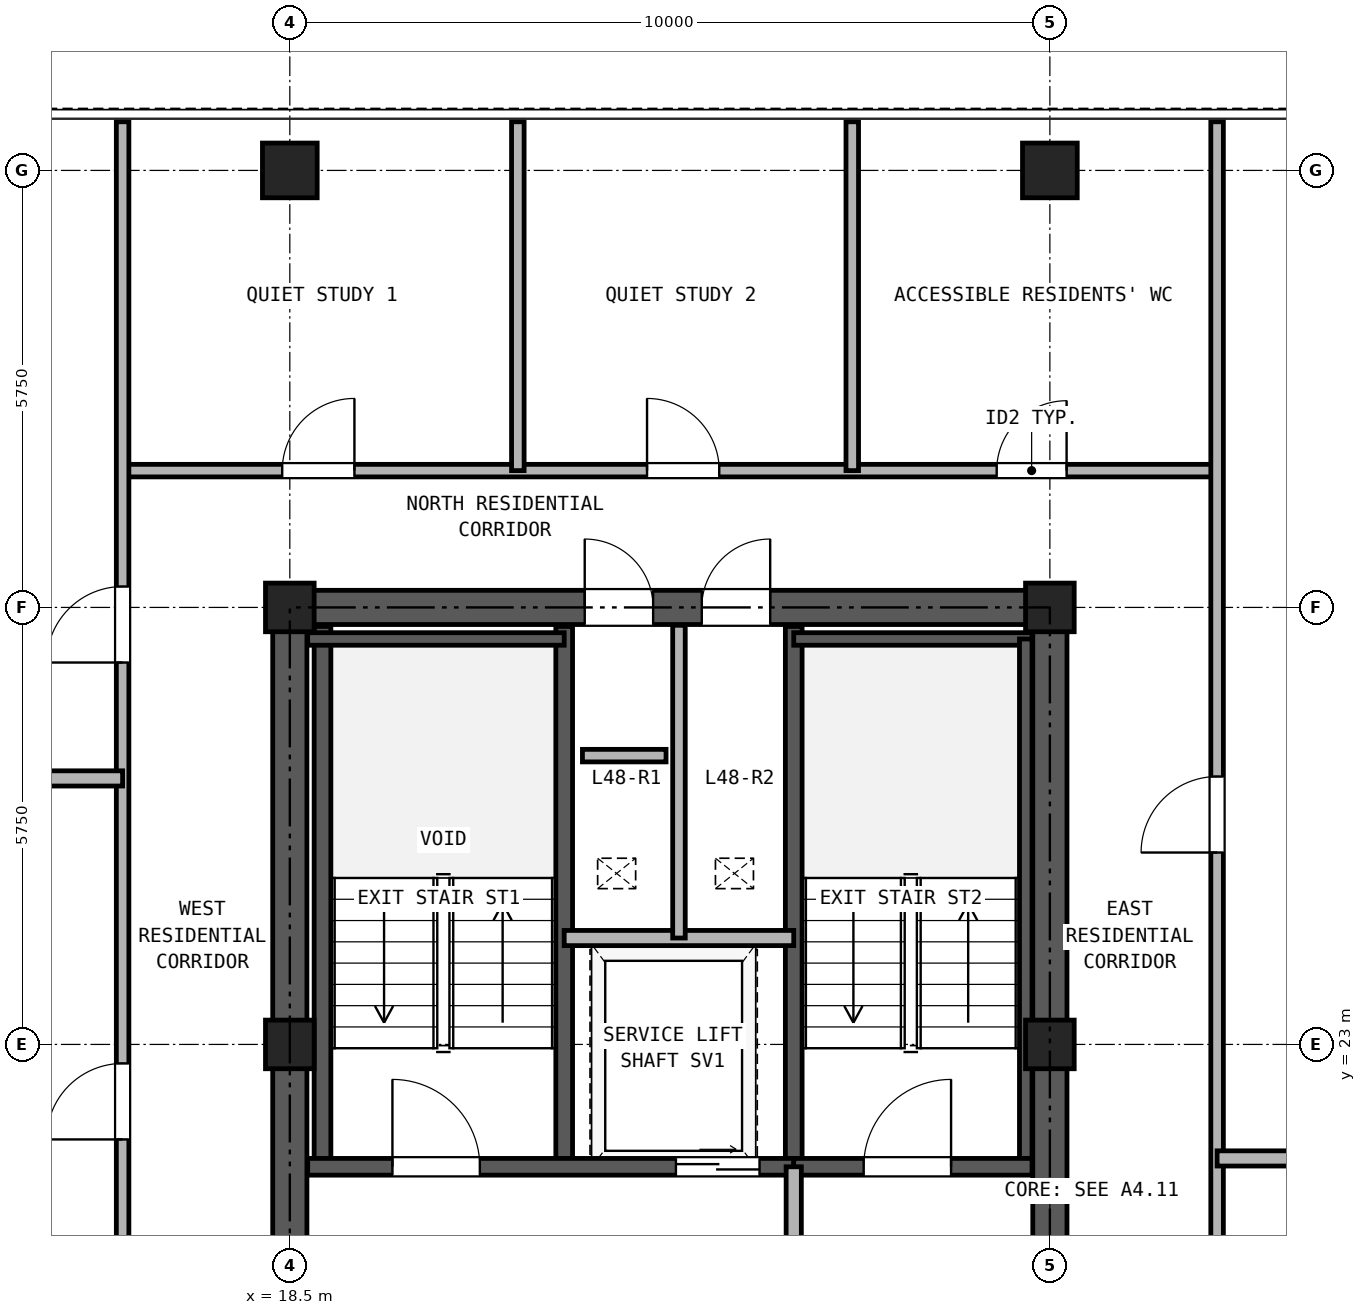
"""IFC4 building model, lengths in metres.
Left out: names, types, materials, properties, quantities, classifications, styles, units other than length and angle.
Written with IfcOpenShell. Run it as: python <this file> out.ifc"""

import sys

from ifc_helpers import new_model, si_unit, direction, frame, frame_2d, origin, origin_2d, place, context, subcontext, project, spatial, rectangle, hollow_rectangle, extrude, source, transform, mapped, element, fill, save


model = new_model("IFC4")
c1 = context("Model", 3, precision=1e-05, world=origin(), true_north=direction((0.0, 1.0)))
c2 = subcontext(c1, "Body", "Model", "MODEL_VIEW")
j1 = project(units=[si_unit("LENGTHUNIT", "METRE"), si_unit("PLANEANGLEUNIT", "RADIAN")], contexts=[c1])
p1 = place(None, origin())
s1 = spatial("IfcSite", under=j1, at=p1, CompositionType="ELEMENT")
p2 = place(p1, origin())
s2 = spatial("IfcBuilding", under=s1, at=p2, CompositionType="ELEMENT")
p3 = place(p2, frame((0.0, 0.0, 172.1)))
s3 = spatial("IfcBuildingStorey", under=s2, at=p3, CompositionType="ELEMENT", Elevation=172.1)
m1 = source(origin(), c2, "Body", "SweptSolid", [
    extrude(hollow_rectangle(XDim=0.72, YDim=0.72, WallThickness=0.04, at=origin_2d()), origin(), (0.0, 0.0, 1.0), 2.95),
])
for number, where, z_axis, x_axis in (
    (1, (18.5, 34.5, 0.0), (0.0, 0.0, 1.0), (1.0, 0.0, 0.0)),
    (2, (28.5, 34.5, 0.0), (0.0, 0.0, 1.0), (1.0, 0.0, 0.0)),
):
    element("IfcColumn", number, at=place(p3, frame(where, z_axis=z_axis, x_axis=x_axis)), inside=s3, PredefinedType="COLUMN", context=c2, shape_type="MappedRepresentation", body=[
        mapped(m1, transform((0.0, 0.0, 0.0), x_axis=(1.0, 0.0, 0.0), y_axis=(0.0, 1.0, 0.0), z_axis=(0.0, 0.0, 1.0), scale=1.0)),
    ])
m2 = source(origin(), c2, "Body", "SweptSolid", [
    extrude(hollow_rectangle(XDim=0.64, YDim=0.64, WallThickness=0.035, at=origin_2d()), origin(), (0.0, 0.0, 1.0), 2.95),
])
for number, where, z_axis, x_axis in (
    (3, (18.5, 23.0, 0.0), (0.0, 0.0, 1.0), (1.0, 0.0, 0.0)),
    (4, (18.5, 28.75, 0.0), (0.0, 0.0, 1.0), (1.0, 0.0, 0.0)),
    (5, (28.5, 23.0, 0.0), (0.0, 0.0, 1.0), (1.0, 0.0, 0.0)),
    (6, (28.5, 28.75, 0.0), (0.0, 0.0, 1.0), (1.0, 0.0, 0.0)),
):
    element("IfcColumn", number, at=place(p3, frame(where, z_axis=z_axis, x_axis=x_axis)), inside=s3, PredefinedType="COLUMN", context=c2, shape_type="MappedRepresentation", body=[
        mapped(m2, transform((0.0, 0.0, 0.0), x_axis=(1.0, 0.0, 0.0), y_axis=(0.0, 1.0, 0.0), z_axis=(0.0, 0.0, 1.0), scale=1.0)),
    ])
p4 = place(p3, frame((18.275, 28.75, 0.0), z_axis=(0.0, 0.0, 1.0), x_axis=(1.0, 0.0, 0.0)))
e7 = element("IfcWall", 7, at=p4, inside=s3, PredefinedType="SHEAR", context=c2, shape_type="SweptSolid", body=[
    extrude(rectangle(XDim=10.45, YDim=0.45, at=frame_2d((5.225, 0.0))), origin(), (0.0, 0.0, 1.0), 2.95),
])
p5 = place(p4, frame((4.105, 0.0, 0.0)))
e8 = element("IfcOpeningElement", 8, at=p5, cuts=e7, PredefinedType="OPENING", context=c2, shape_type="SweptSolid", body=[
    extrude(rectangle(XDim=0.9, YDim=2.05, at=frame_2d((0.45, 1.025))), frame((0.0, 0.235, 0.0), z_axis=(0.0, -1.0, 0.0), x_axis=(1.0, 0.0, 0.0)), (0.0, 0.0, 1.0), 0.47),
])
p6 = place(p4, frame((5.645, 0.0, 0.0)))
e9 = element("IfcOpeningElement", 9, at=p6, cuts=e7, PredefinedType="OPENING", context=c2, shape_type="SweptSolid", body=[
    extrude(rectangle(XDim=0.9, YDim=2.05, at=frame_2d((0.45, 1.025))), frame((0.0, 0.235, 0.0), z_axis=(0.0, -1.0, 0.0), x_axis=(1.0, 0.0, 0.0)), (0.0, 0.0, 1.0), 0.47),
])
p7 = place(p3, frame((18.5, 11.725, 0.0), z_axis=(0.0, 0.0, 1.0), x_axis=(0.0, 1.0, 0.0)))
e10 = element("IfcWall", 10, at=p7, inside=s3, PredefinedType="SHEAR", context=c2, shape_type="SweptSolid", body=[
    extrude(rectangle(XDim=16.8, YDim=0.45, at=frame_2d((8.4, 0.0))), origin(), (0.0, 0.0, 1.0), 2.95),
])
p8 = place(p7, frame((7.425, 0.0, 0.0)))
e11 = element("IfcOpeningElement", 11, at=p8, cuts=e10, PredefinedType="OPENING", context=c2, shape_type="SweptSolid", body=[
    extrude(rectangle(XDim=1.15, YDim=2.2, at=frame_2d((0.575, 1.1))), frame((0.0, 0.235, 0.0), z_axis=(0.0, -1.0, 0.0), x_axis=(1.0, 0.0, 0.0)), (0.0, 0.0, 1.0), 0.47),
])
p9 = place(p3, frame((28.5, 11.725, 0.0), z_axis=(0.0, 0.0, 1.0), x_axis=(0.0, 1.0, 0.0)))
e12 = element("IfcWall", 12, at=p9, inside=s3, PredefinedType="SHEAR", context=c2, shape_type="SweptSolid", body=[
    extrude(rectangle(XDim=16.8, YDim=0.45, at=frame_2d((8.4, 0.0))), origin(), (0.0, 0.0, 1.0), 2.95),
])
p10 = place(p9, frame((7.425, 0.0, 0.0)))
e13 = element("IfcOpeningElement", 13, at=p10, cuts=e12, PredefinedType="OPENING", context=c2, shape_type="SweptSolid", body=[
    extrude(rectangle(XDim=1.15, YDim=2.2, at=frame_2d((0.575, 1.1))), frame((0.0, 0.235, 0.0), z_axis=(0.0, -1.0, 0.0), x_axis=(1.0, 0.0, 0.0)), (0.0, 0.0, 1.0), 0.47),
])
for number, where, z_axis, x_axis in (
    (14, (18.93, 21.39, 0.0), (0.0, 0.0, 1.0), (0.0, 1.0, 0.0)),
    (15, (22.11, 21.39, 0.0), (0.0, 0.0, 1.0), (0.0, 1.0, 0.0)),
    (16, (25.13, 21.39, 0.0), (0.0, 0.0, 1.0), (0.0, 1.0, 0.0)),
):
    element("IfcWall", number, at=place(p3, frame(where, z_axis=z_axis, x_axis=x_axis)), inside=s3, PredefinedType="SOLIDWALL", context=c2, shape_type="SweptSolid", body=[
        extrude(rectangle(XDim=7.11, YDim=0.22, at=frame_2d((3.555, 0.0))), origin(), (0.0, 0.0, 1.0), 2.95),
    ])
p11 = place(p3, frame((18.735, 28.335, 0.0), z_axis=(0.0, 0.0, 1.0), x_axis=(1.0, 0.0, 0.0)))
e17 = element("IfcWall", 17, at=p11, inside=s3, PredefinedType="PARTITIONING", context=c2, shape_type="SweptSolid", body=[
    extrude(rectangle(XDim=3.375, YDim=0.165, at=frame_2d((1.688, 0.0))), origin(), (0.0, 0.0, 1.0), 2.95),
])
p12 = place(p3, frame((25.13, 28.335, 0.0), z_axis=(0.0, 0.0, 1.0), x_axis=(1.0, 0.0, 0.0)))
e18 = element("IfcWall", 18, at=p12, inside=s3, PredefinedType="PARTITIONING", context=c2, shape_type="SweptSolid", body=[
    extrude(rectangle(XDim=3.135, YDim=0.165, at=frame_2d((1.567, 0.0))), origin(), (0.0, 0.0, 1.0), 2.95),
])
p13 = place(p3, frame((28.183, 21.39, 0.0), z_axis=(0.0, 0.0, 1.0), x_axis=(0.0, 1.0, 0.0)))
e19 = element("IfcWall", 19, at=p13, inside=s3, PredefinedType="PARTITIONING", context=c2, shape_type="SweptSolid", body=[
    extrude(rectangle(XDim=6.945, YDim=0.165, at=frame_2d((3.473, 0.0))), origin(), (0.0, 0.0, 1.0), 2.95),
])
p14 = place(p3, frame((18.735, 21.39, 0.0), z_axis=(0.0, 0.0, 1.0), x_axis=(1.0, 0.0, 0.0)))
e20 = element("IfcWall", 20, at=p14, inside=s3, PredefinedType="SOLIDWALL", context=c2, shape_type="SweptSolid", body=[
    extrude(rectangle(XDim=6.395, YDim=0.22, at=frame_2d((3.197, 0.0))), origin(), (0.0, 0.0, 1.0), 2.95),
])
p15 = place(p14, frame((1.115, 0.0, 0.0)))
e21 = element("IfcOpeningElement", 21, at=p15, cuts=e20, PredefinedType="OPENING", context=c2, shape_type="SweptSolid", body=[
    extrude(rectangle(XDim=1.15, YDim=2.2, at=frame_2d((0.575, 1.1))), frame((0.0, 0.12, 0.0), z_axis=(0.0, -1.0, 0.0), x_axis=(1.0, 0.0, 0.0)), (0.0, 0.0, 1.0), 0.24),
])
p16 = place(p14, frame((4.845, 0.0, 0.0)))
e22 = element("IfcOpeningElement", 22, at=p16, cuts=e20, PredefinedType="OPENING", context=c2, shape_type="SweptSolid", body=[
    extrude(rectangle(XDim=1.1, YDim=2.25, at=frame_2d((0.55, 1.125))), frame((0.0, 0.12, 0.0), z_axis=(0.0, -1.0, 0.0), x_axis=(1.0, 0.0, 0.0)), (0.0, 0.0, 1.0), 0.24),
])
p17 = place(p3, frame((25.13, 21.39, 0.0), z_axis=(0.0, 0.0, 1.0), x_axis=(1.0, 0.0, 0.0)))
e23 = element("IfcWall", 23, at=p17, inside=s3, PredefinedType="SOLIDWALL", context=c2, shape_type="SweptSolid", body=[
    extrude(rectangle(XDim=3.135, YDim=0.22, at=frame_2d((1.567, 0.0))), origin(), (0.0, 0.0, 1.0), 2.95),
])
p18 = place(p17, frame((0.92, 0.0, 0.0)))
e24 = element("IfcOpeningElement", 24, at=p18, cuts=e23, PredefinedType="OPENING", context=c2, shape_type="SweptSolid", body=[
    extrude(rectangle(XDim=1.15, YDim=2.2, at=frame_2d((0.575, 1.1))), frame((0.0, 0.12, 0.0), z_axis=(0.0, -1.0, 0.0), x_axis=(1.0, 0.0, 0.0)), (0.0, 0.0, 1.0), 0.24),
])
p19 = place(p3, frame((22.11, 24.4, 0.0), z_axis=(0.0, 0.0, 1.0), x_axis=(1.0, 0.0, 0.0)))
e25 = element("IfcWall", 25, at=p19, inside=s3, PredefinedType="PARTITIONING", context=c2, shape_type="SweptSolid", body=[
    extrude(rectangle(XDim=3.02, YDim=0.2, at=frame_2d((1.51, 0.0))), origin(), (0.0, 0.0, 1.0), 2.95),
])
p20 = place(p3, frame((23.62, 24.4, 0.0), z_axis=(0.0, 0.0, 1.0), x_axis=(0.0, 1.0, 0.0)))
e26 = element("IfcWall", 26, at=p20, inside=s3, PredefinedType="PARTITIONING", context=c2, shape_type="SweptSolid", body=[
    extrude(rectangle(XDim=4.115, YDim=0.165, at=frame_2d((2.058, 0.0))), origin(), (0.0, 0.0, 1.0), 2.95),
])
p21 = place(p3, frame((25.13, 18.0, 0.0), z_axis=(0.0, 0.0, 1.0), x_axis=(0.0, 1.0, 0.0)))
e27 = element("IfcWall", 27, at=p21, inside=s3, PredefinedType="PARTITIONING", context=c2, shape_type="SweptSolid", body=[
    extrude(rectangle(XDim=3.39, YDim=0.2, at=frame_2d((1.695, 0.0))), origin(), (0.0, 0.0, 1.0), 2.95),
])
p22 = place(p21, frame((1.1, 0.0, 0.0)))
e28 = element("IfcOpeningElement", 28, at=p22, cuts=e27, PredefinedType="OPENING", context=c2, shape_type="SweptSolid", body=[
    extrude(rectangle(XDim=1.15, YDim=2.2, at=frame_2d((0.575, 1.1))), frame((0.0, 0.11, 0.0), z_axis=(0.0, -1.0, 0.0), x_axis=(1.0, 0.0, 0.0)), (0.0, 0.0, 1.0), 0.22),
])
p23 = place(p3, frame((16.3, 30.55, 0.0), z_axis=(0.0, 0.0, 1.0), x_axis=(1.0, 0.0, 0.0)))
e29 = element("IfcWall", 29, at=p23, inside=s3, PredefinedType="PARTITIONING", context=c2, shape_type="SweptSolid", body=[
    extrude(rectangle(XDim=14.4, YDim=0.165, at=frame_2d((7.2, 0.0))), origin(), (0.0, 0.0, 1.0), 2.95),
])
p24 = place(p23, frame((2.1, 0.0, 0.0)))
e30 = element("IfcOpeningElement", 30, at=p24, cuts=e29, PredefinedType="OPENING", context=c2, shape_type="SweptSolid", body=[
    extrude(rectangle(XDim=0.95, YDim=2.15, at=frame_2d((0.475, 1.075))), frame((0.0, 0.093, 0.0), z_axis=(0.0, -1.0, 0.0), x_axis=(1.0, 0.0, 0.0)), (0.0, 0.0, 1.0), 0.185),
])
p25 = place(p23, frame((6.9, 0.0, 0.0)))
e31 = element("IfcOpeningElement", 31, at=p25, cuts=e29, PredefinedType="OPENING", context=c2, shape_type="SweptSolid", body=[
    extrude(rectangle(XDim=0.95, YDim=2.15, at=frame_2d((0.475, 1.075))), frame((0.0, 0.093, 0.0), z_axis=(0.0, -1.0, 0.0), x_axis=(1.0, 0.0, 0.0)), (0.0, 0.0, 1.0), 0.185),
])
p26 = place(p23, frame((11.5, 0.0, 0.0)))
e32 = element("IfcOpeningElement", 32, at=p26, cuts=e29, PredefinedType="OPENING", context=c2, shape_type="SweptSolid", body=[
    extrude(rectangle(XDim=0.92, YDim=2.1, at=frame_2d((0.46, 1.05))), frame((0.0, 0.093, 0.0), z_axis=(0.0, -1.0, 0.0), x_axis=(1.0, 0.0, 0.0)), (0.0, 0.0, 1.0), 0.185),
])
p27 = place(p3, frame((16.3, 11.45, 0.0), z_axis=(0.0, 0.0, 1.0), x_axis=(0.0, 1.0, 0.0)))
e33 = element("IfcWall", 33, at=p27, inside=s3, PredefinedType="PARTITIONING", context=c2, shape_type="SweptSolid", body=[
    extrude(rectangle(XDim=23.69, YDim=0.165, at=frame_2d((11.845, 0.0))), origin(), (0.0, 0.0, 1.0), 2.95),
])
p28 = place(p27, frame((2.775, 0.0, 0.0)))
e34 = element("IfcOpeningElement", 34, at=p28, cuts=e33, PredefinedType="OPENING", context=c2, shape_type="SweptSolid", body=[
    extrude(rectangle(XDim=1.0, YDim=2.15, at=frame_2d((0.5, 1.075))), frame((0.0, 0.093, 0.0), z_axis=(0.0, -1.0, 0.0), x_axis=(1.0, 0.0, 0.0)), (0.0, 0.0, 1.0), 0.185),
])
p29 = place(p27, frame((10.3, 0.0, 0.0)))
e35 = element("IfcOpeningElement", 35, at=p29, cuts=e33, PredefinedType="OPENING", context=c2, shape_type="SweptSolid", body=[
    extrude(rectangle(XDim=1.0, YDim=2.15, at=frame_2d((0.5, 1.075))), frame((0.0, 0.093, 0.0), z_axis=(0.0, -1.0, 0.0), x_axis=(1.0, 0.0, 0.0)), (0.0, 0.0, 1.0), 0.185),
])
p30 = place(p27, frame((16.575, 0.0, 0.0)))
e36 = element("IfcOpeningElement", 36, at=p30, cuts=e33, PredefinedType="OPENING", context=c2, shape_type="SweptSolid", body=[
    extrude(rectangle(XDim=1.0, YDim=2.15, at=frame_2d((0.5, 1.075))), frame((0.0, 0.093, 0.0), z_axis=(0.0, -1.0, 0.0), x_axis=(1.0, 0.0, 0.0)), (0.0, 0.0, 1.0), 0.185),
])
p31 = place(p3, frame((30.7, 11.45, 0.0), z_axis=(0.0, 0.0, 1.0), x_axis=(0.0, 1.0, 0.0)))
e37 = element("IfcWall", 37, at=p31, inside=s3, PredefinedType="PARTITIONING", context=c2, shape_type="SweptSolid", body=[
    extrude(rectangle(XDim=23.69, YDim=0.165, at=frame_2d((11.845, 0.0))), origin(), (0.0, 0.0, 1.0), 2.95),
])
p32 = place(p31, frame((4.525, 0.0, 0.0)))
e38 = element("IfcOpeningElement", 38, at=p32, cuts=e37, PredefinedType="OPENING", context=c2, shape_type="SweptSolid", body=[
    extrude(rectangle(XDim=1.0, YDim=2.15, at=frame_2d((0.5, 1.075))), frame((0.0, 0.093, 0.0), z_axis=(0.0, -1.0, 0.0), x_axis=(1.0, 0.0, 0.0)), (0.0, 0.0, 1.0), 0.185),
])
p33 = place(p31, frame((14.075, 0.0, 0.0)))
e39 = element("IfcOpeningElement", 39, at=p33, cuts=e37, PredefinedType="OPENING", context=c2, shape_type="SweptSolid", body=[
    extrude(rectangle(XDim=1.0, YDim=2.15, at=frame_2d((0.5, 1.075))), frame((0.0, 0.093, 0.0), z_axis=(0.0, -1.0, 0.0), x_axis=(1.0, 0.0, 0.0)), (0.0, 0.0, 1.0), 0.185),
])
p34 = place(p3, frame((0.16, 26.5, 0.0), z_axis=(0.0, 0.0, 1.0), x_axis=(1.0, 0.0, 0.0)))
e40 = element("IfcWall", 40, at=p34, inside=s3, PredefinedType="PARTITIONING", context=c2, shape_type="SweptSolid", body=[
    extrude(rectangle(XDim=16.14, YDim=0.2, at=frame_2d((8.07, 0.0))), origin(), (0.0, 0.0, 1.0), 2.95),
])
p35 = place(p3, frame((30.7, 21.5, 0.0), z_axis=(0.0, 0.0, 1.0), x_axis=(1.0, 0.0, 0.0)))
e41 = element("IfcWall", 41, at=p35, inside=s3, PredefinedType="PARTITIONING", context=c2, shape_type="SweptSolid", body=[
    extrude(rectangle(XDim=10.94, YDim=0.2, at=frame_2d((5.47, 0.0))), origin(), (0.0, 0.0, 1.0), 2.95),
])
for number, where, z_axis, x_axis in (
    (42, (21.5, 30.55, 0.0), (0.0, 0.0, 1.0), (0.0, 1.0, 0.0)),
    (43, (25.9, 30.55, 0.0), (0.0, 0.0, 1.0), (0.0, 1.0, 0.0)),
):
    element("IfcWall", number, at=place(p3, frame(where, z_axis=z_axis, x_axis=x_axis)), inside=s3, PredefinedType="PARTITIONING", context=c2, shape_type="SweptSolid", body=[
        extrude(rectangle(XDim=4.59, YDim=0.165, at=frame_2d((2.295, 0.0))), origin(), (0.0, 0.0, 1.0), 2.95),
    ])
p36 = place(p3, frame((22.35, 26.8, 0.0), z_axis=(0.0, 0.0, 1.0), x_axis=(1.0, 0.0, 0.0)))
e44 = element("IfcWall", 44, at=p36, inside=s3, PredefinedType="PARTITIONING", context=c2, shape_type="SweptSolid", body=[
    extrude(rectangle(XDim=1.1, YDim=0.165, at=frame_2d((0.55, 0.0))), origin(), (0.0, 0.0, 1.0), 2.95),
])
p37 = place(p15, frame((1.15, 0.0, 0.0), z_axis=(0.0, 0.0, 1.0), x_axis=(-1.0, 0.0, 0.0)))
e45 = element("IfcDoor", 45, at=p37, inside=s3, OperationType="SINGLE_SWING_LEFT", PredefinedType="DOOR", context=c2, shape_type="SweptSolid", body=[
    extrude(rectangle(XDim=1.15, YDim=2.2, at=frame_2d((0.575, 1.1))), frame((0.0, 0.025, 0.0), z_axis=(0.0, -1.0, 0.0), x_axis=(1.0, 0.0, 0.0)), (0.0, 0.0, 1.0), 0.05),
])
fill(e21, e45)
p38 = place(p18, frame((1.15, 0.0, 0.0), z_axis=(0.0, 0.0, 1.0), x_axis=(-1.0, 0.0, 0.0)))
e46 = element("IfcDoor", 46, at=p38, inside=s3, OperationType="SINGLE_SWING_RIGHT", PredefinedType="DOOR", context=c2, shape_type="SweptSolid", body=[
    extrude(rectangle(XDim=1.15, YDim=2.2, at=frame_2d((0.575, 1.1))), frame((0.0, 0.025, 0.0), z_axis=(0.0, -1.0, 0.0), x_axis=(1.0, 0.0, 0.0)), (0.0, 0.0, 1.0), 0.05),
])
fill(e24, e46)
p39 = place(p16, frame((1.1, 0.0, 0.0), z_axis=(0.0, 0.0, 1.0), x_axis=(-1.0, 0.0, 0.0)))
e47 = element("IfcDoor", 47, at=p39, inside=s3, OperationType="DOUBLE_DOOR_SLIDING", PredefinedType="DOOR", context=c2, shape_type="SweptSolid", body=[
    extrude(rectangle(XDim=1.1, YDim=2.25, at=frame_2d((0.55, 1.125))), frame((0.0, 0.025, 0.0), z_axis=(0.0, -1.0, 0.0), x_axis=(1.0, 0.0, 0.0)), (0.0, 0.0, 1.0), 0.05),
])
fill(e22, e47)
p40 = place(p5, origin())
e48 = element("IfcDoor", 48, at=p40, inside=s3, OperationType="SINGLE_SWING_LEFT", PredefinedType="DOOR", context=c2, shape_type="SweptSolid", body=[
    extrude(rectangle(XDim=0.9, YDim=2.05, at=frame_2d((0.45, 1.025))), frame((0.0, 0.025, 0.0), z_axis=(0.0, -1.0, 0.0), x_axis=(1.0, 0.0, 0.0)), (0.0, 0.0, 1.0), 0.05),
])
fill(e8, e48)
p41 = place(p6, origin())
e49 = element("IfcDoor", 49, at=p41, inside=s3, OperationType="SINGLE_SWING_RIGHT", PredefinedType="DOOR", context=c2, shape_type="SweptSolid", body=[
    extrude(rectangle(XDim=0.9, YDim=2.05, at=frame_2d((0.45, 1.025))), frame((0.0, 0.025, 0.0), z_axis=(0.0, -1.0, 0.0), x_axis=(1.0, 0.0, 0.0)), (0.0, 0.0, 1.0), 0.05),
])
fill(e9, e49)
p42 = place(p29, origin())
e50 = element("IfcDoor", 50, at=p42, inside=s3, OperationType="SINGLE_SWING_LEFT", PredefinedType="DOOR", context=c2, shape_type="SweptSolid", body=[
    extrude(rectangle(XDim=1.0, YDim=2.15, at=frame_2d((0.5, 1.075))), frame((0.0, 0.025, 0.0), z_axis=(0.0, -1.0, 0.0), x_axis=(1.0, 0.0, 0.0)), (0.0, 0.0, 1.0), 0.05),
])
fill(e35, e50)
p43 = place(p30, origin())
e51 = element("IfcDoor", 51, at=p43, inside=s3, OperationType="SINGLE_SWING_LEFT", PredefinedType="DOOR", context=c2, shape_type="SweptSolid", body=[
    extrude(rectangle(XDim=1.0, YDim=2.15, at=frame_2d((0.5, 1.075))), frame((0.0, 0.025, 0.0), z_axis=(0.0, -1.0, 0.0), x_axis=(1.0, 0.0, 0.0)), (0.0, 0.0, 1.0), 0.05),
])
fill(e36, e51)
p44 = place(p33, frame((1.0, 0.0, 0.0), z_axis=(0.0, 0.0, 1.0), x_axis=(-1.0, 0.0, 0.0)))
e52 = element("IfcDoor", 52, at=p44, inside=s3, OperationType="SINGLE_SWING_LEFT", PredefinedType="DOOR", context=c2, shape_type="SweptSolid", body=[
    extrude(rectangle(XDim=1.0, YDim=2.15, at=frame_2d((0.5, 1.075))), frame((0.0, 0.025, 0.0), z_axis=(0.0, -1.0, 0.0), x_axis=(1.0, 0.0, 0.0)), (0.0, 0.0, 1.0), 0.05),
])
fill(e39, e52)
p45 = place(p24, origin())
e53 = element("IfcDoor", 53, at=p45, inside=s3, OperationType="SINGLE_SWING_RIGHT", PredefinedType="DOOR", context=c2, shape_type="SweptSolid", body=[
    extrude(rectangle(XDim=0.95, YDim=2.15, at=frame_2d((0.475, 1.075))), frame((0.0, 0.025, 0.0), z_axis=(0.0, -1.0, 0.0), x_axis=(1.0, 0.0, 0.0)), (0.0, 0.0, 1.0), 0.05),
])
fill(e30, e53)
p46 = place(p25, origin())
e54 = element("IfcDoor", 54, at=p46, inside=s3, OperationType="SINGLE_SWING_LEFT", PredefinedType="DOOR", context=c2, shape_type="SweptSolid", body=[
    extrude(rectangle(XDim=0.95, YDim=2.15, at=frame_2d((0.475, 1.075))), frame((0.0, 0.025, 0.0), z_axis=(0.0, -1.0, 0.0), x_axis=(1.0, 0.0, 0.0)), (0.0, 0.0, 1.0), 0.05),
])
fill(e31, e54)
p47 = place(p26, origin())
e55 = element("IfcDoor", 55, at=p47, inside=s3, OperationType="SINGLE_SWING_RIGHT", PredefinedType="DOOR", context=c2, shape_type="SweptSolid", body=[
    extrude(rectangle(XDim=0.92, YDim=2.1, at=frame_2d((0.46, 1.05))), frame((0.0, 0.025, 0.0), z_axis=(0.0, -1.0, 0.0), x_axis=(1.0, 0.0, 0.0)), (0.0, 0.0, 1.0), 0.05),
])
fill(e32, e55)
save(model, sys.argv[1])
